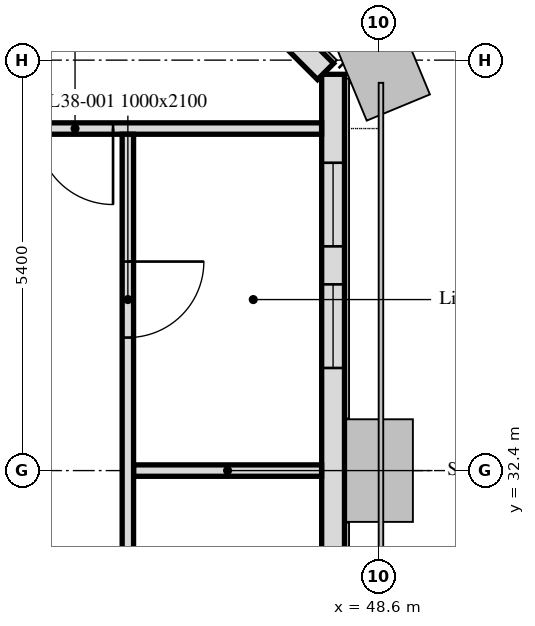
"""IFC4 building model, lengths in metres.
Left out: names, types, materials, properties, quantities, classifications, styles, units other than length and angle.
Written with IfcOpenShell. Run it as: python <this file> out.ifc"""

import sys

from ifc_helpers import new_model, si_unit, direction, frame, frame_2d, origin, place, context, subcontext, project, spatial, rectangle, extrude, element, fill, save


model = new_model("IFC4")
c1 = context("Model", 3, precision=1e-05, world=origin(), true_north=direction((0.0, 1.0)))
c2 = subcontext(c1, "Body", "Model", "MODEL_VIEW")
j1 = project(units=[si_unit("LENGTHUNIT", "METRE"), si_unit("PLANEANGLEUNIT", "RADIAN")], contexts=[c1])
p1 = place(None, origin())
s1 = spatial("IfcSite", under=j1, at=p1, CompositionType="ELEMENT")
p2 = place(p1, origin())
s2 = spatial("IfcBuilding", under=s1, at=p2, CompositionType="ELEMENT")
p3 = place(p2, frame((0.0, 0.0, 162.7)))
s3 = spatial("IfcBuildingStorey", under=s2, at=p3, CompositionType="ELEMENT", Elevation=162.7)
p4 = place(p3, frame((48.0, 5.586, 0.0), z_axis=(0.0, 0.0, 1.0), x_axis=(0.0, 1.0, 0.0)))
e1 = element("IfcWall", 1, at=p4, inside=s3, PredefinedType="SOLIDWALL", context=c2, shape_type="SweptSolid", body=[
    extrude(rectangle(XDim=32.027, YDim=0.3, at=frame_2d((16.014, 0.0))), origin(), (0.0, 0.0, 1.0), 3.0),
])
p5 = place(p4, frame((1.164, 0.0, 0.9)))
e2 = element("IfcOpeningElement", 2, at=p5, cuts=e1, PredefinedType="OPENING", context=c2, shape_type="SweptSolid", body=[
    extrude(rectangle(XDim=1.1, YDim=1.7, at=frame_2d((0.55, 0.85))), frame((0.0, 0.16, 0.0), z_axis=(0.0, -1.0, 0.0), x_axis=(1.0, 0.0, 0.0)), (0.0, 0.0, 1.0), 0.32),
])
p6 = place(p4, frame((2.589, 0.0, 0.9)))
e3 = element("IfcOpeningElement", 3, at=p6, cuts=e1, PredefinedType="OPENING", context=c2, shape_type="SweptSolid", body=[
    extrude(rectangle(XDim=0.65, YDim=1.7, at=frame_2d((0.325, 0.85))), frame((0.0, 0.16, 0.0), z_axis=(0.0, -1.0, 0.0), x_axis=(1.0, 0.0, 0.0)), (0.0, 0.0, 1.0), 0.32),
])
p7 = place(p4, frame((6.214, 0.0, 0.9)))
e4 = element("IfcOpeningElement", 4, at=p7, cuts=e1, PredefinedType="OPENING", context=c2, shape_type="SweptSolid", body=[
    extrude(rectangle(XDim=3.4, YDim=1.7, at=frame_2d((1.7, 0.85))), frame((0.0, 0.16, 0.0), z_axis=(0.0, -1.0, 0.0), x_axis=(1.0, 0.0, 0.0)), (0.0, 0.0, 1.0), 0.32),
])
p8 = place(p4, frame((11.964, 0.0, 0.9)))
e5 = element("IfcOpeningElement", 5, at=p8, cuts=e1, PredefinedType="OPENING", context=c2, shape_type="SweptSolid", body=[
    extrude(rectangle(XDim=1.1, YDim=1.7, at=frame_2d((0.55, 0.85))), frame((0.0, 0.16, 0.0), z_axis=(0.0, -1.0, 0.0), x_axis=(1.0, 0.0, 0.0)), (0.0, 0.0, 1.0), 0.32),
])
p9 = place(p4, frame((13.564, 0.0, 0.9)))
e6 = element("IfcOpeningElement", 6, at=p9, cuts=e1, PredefinedType="OPENING", context=c2, shape_type="SweptSolid", body=[
    extrude(rectangle(XDim=1.1, YDim=1.7, at=frame_2d((0.55, 0.85))), frame((0.0, 0.16, 0.0), z_axis=(0.0, -1.0, 0.0), x_axis=(1.0, 0.0, 0.0)), (0.0, 0.0, 1.0), 0.32),
])
p10 = place(p4, frame((17.364, 0.0, 0.9)))
e7 = element("IfcOpeningElement", 7, at=p10, cuts=e1, PredefinedType="OPENING", context=c2, shape_type="SweptSolid", body=[
    extrude(rectangle(XDim=1.1, YDim=1.7, at=frame_2d((0.55, 0.85))), frame((0.0, 0.16, 0.0), z_axis=(0.0, -1.0, 0.0), x_axis=(1.0, 0.0, 0.0)), (0.0, 0.0, 1.0), 0.32),
])
p11 = place(p4, frame((18.964, 0.0, 0.9)))
e8 = element("IfcOpeningElement", 8, at=p11, cuts=e1, PredefinedType="OPENING", context=c2, shape_type="SweptSolid", body=[
    extrude(rectangle(XDim=1.1, YDim=1.7, at=frame_2d((0.55, 0.85))), frame((0.0, 0.16, 0.0), z_axis=(0.0, -1.0, 0.0), x_axis=(1.0, 0.0, 0.0)), (0.0, 0.0, 1.0), 0.32),
])
p12 = place(p4, frame((22.764, 0.0, 0.9)))
e9 = element("IfcOpeningElement", 9, at=p12, cuts=e1, PredefinedType="OPENING", context=c2, shape_type="SweptSolid", body=[
    extrude(rectangle(XDim=1.1, YDim=1.7, at=frame_2d((0.55, 0.85))), frame((0.0, 0.16, 0.0), z_axis=(0.0, -1.0, 0.0), x_axis=(1.0, 0.0, 0.0)), (0.0, 0.0, 1.0), 0.32),
])
p13 = place(p4, frame((24.364, 0.0, 0.9)))
e10 = element("IfcOpeningElement", 10, at=p13, cuts=e1, PredefinedType="OPENING", context=c2, shape_type="SweptSolid", body=[
    extrude(rectangle(XDim=1.1, YDim=1.7, at=frame_2d((0.55, 0.85))), frame((0.0, 0.16, 0.0), z_axis=(0.0, -1.0, 0.0), x_axis=(1.0, 0.0, 0.0)), (0.0, 0.0, 1.0), 0.32),
])
p14 = place(p4, frame((28.164, 0.0, 0.9)))
e11 = element("IfcOpeningElement", 11, at=p14, cuts=e1, PredefinedType="OPENING", context=c2, shape_type="SweptSolid", body=[
    extrude(rectangle(XDim=1.1, YDim=1.7, at=frame_2d((0.55, 0.85))), frame((0.0, 0.16, 0.0), z_axis=(0.0, -1.0, 0.0), x_axis=(1.0, 0.0, 0.0)), (0.0, 0.0, 1.0), 0.32),
])
p15 = place(p4, frame((29.764, 0.0, 0.9)))
e12 = element("IfcOpeningElement", 12, at=p15, cuts=e1, PredefinedType="OPENING", context=c2, shape_type="SweptSolid", body=[
    extrude(rectangle(XDim=1.1, YDim=1.7, at=frame_2d((0.55, 0.85))), frame((0.0, 0.16, 0.0), z_axis=(0.0, -1.0, 0.0), x_axis=(1.0, 0.0, 0.0)), (0.0, 0.0, 1.0), 0.32),
])
p16 = place(p3, frame((47.901, 37.65, 0.0), z_axis=(0.0, 0.0, 1.0), x_axis=(-0.707106781187, 0.707106781187, 0.0)))
e13 = element("IfcWall", 13, at=p16, inside=s3, PredefinedType="SOLIDWALL", context=c2, shape_type="SweptSolid", body=[
    extrude(rectangle(XDim=6.86, YDim=0.3, at=frame_2d((3.43, 0.0))), origin(), (0.0, 0.0, 1.0), 3.0),
])
p17 = place(p16, frame((1.28, 0.0, 0.9)))
e14 = element("IfcOpeningElement", 14, at=p17, cuts=e13, PredefinedType="OPENING", context=c2, shape_type="SweptSolid", body=[
    extrude(rectangle(XDim=1.1, YDim=1.7, at=frame_2d((0.55, 0.85))), frame((0.0, 0.16, 0.0), z_axis=(0.0, -1.0, 0.0), x_axis=(1.0, 0.0, 0.0)), (0.0, 0.0, 1.0), 0.32),
])
p18 = place(p16, frame((4.48, 0.0, 0.9)))
e15 = element("IfcOpeningElement", 15, at=p18, cuts=e13, PredefinedType="OPENING", context=c2, shape_type="SweptSolid", body=[
    extrude(rectangle(XDim=1.1, YDim=1.7, at=frame_2d((0.55, 0.85))), frame((0.0, 0.16, 0.0), z_axis=(0.0, -1.0, 0.0), x_axis=(1.0, 0.0, 0.0)), (0.0, 0.0, 1.0), 0.32),
])
p19 = place(p3, frame((45.375, 32.4, 0.0), z_axis=(0.0, 0.0, 1.0), x_axis=(1.0, 0.0, 0.0)))
e16 = element("IfcWall", 16, at=p19, inside=s3, PredefinedType="PARTITIONING", context=c2, shape_type="SweptSolid", body=[
    extrude(rectangle(XDim=2.474, YDim=0.15, at=frame_2d((1.237, 0.0))), origin(), (0.0, 0.0, 1.0), 2.4),
])
p20 = place(p3, frame((47.849, 36.9, 0.0), z_axis=(0.0, 0.0, 1.0), x_axis=(-1.0, 0.0, 0.0)))
e17 = element("IfcWall", 17, at=p20, inside=s3, PredefinedType="PARTITIONING", context=c2, shape_type="SweptSolid", body=[
    extrude(rectangle(XDim=41.698, YDim=0.15, at=frame_2d((20.849, 0.0))), origin(), (0.0, 0.0, 1.0), 3.0),
])
p21 = place(p20, frame((39.249, 0.0, 0.0)))
e18 = element("IfcOpeningElement", 18, at=p21, cuts=e17, PredefinedType="OPENING", context=c2, shape_type="SweptSolid", body=[
    extrude(rectangle(XDim=1.0, YDim=2.1, at=frame_2d((0.5, 1.05))), frame((0.0, 0.075, 0.0), z_axis=(0.0, -1.0, 0.0), x_axis=(1.0, 0.0, 0.0)), (0.0, 0.0, 1.0), 0.15),
])
p22 = place(p20, frame((28.449, 0.0, 0.0)))
e19 = element("IfcOpeningElement", 19, at=p22, cuts=e17, PredefinedType="OPENING", context=c2, shape_type="SweptSolid", body=[
    extrude(rectangle(XDim=1.0, YDim=2.1, at=frame_2d((0.5, 1.05))), frame((0.0, 0.075, 0.0), z_axis=(0.0, -1.0, 0.0), x_axis=(1.0, 0.0, 0.0)), (0.0, 0.0, 1.0), 0.15),
])
p23 = place(p20, frame((16.849, 0.0, 0.0)))
e20 = element("IfcOpeningElement", 20, at=p23, cuts=e17, PredefinedType="OPENING", context=c2, shape_type="SweptSolid", body=[
    extrude(rectangle(XDim=1.0, YDim=2.1, at=frame_2d((0.5, 1.05))), frame((0.0, 0.075, 0.0), z_axis=(0.0, -1.0, 0.0), x_axis=(1.0, 0.0, 0.0)), (0.0, 0.0, 1.0), 0.15),
])
p24 = place(p20, frame((11.449, 0.0, 0.0)))
e21 = element("IfcOpeningElement", 21, at=p24, cuts=e17, PredefinedType="OPENING", context=c2, shape_type="SweptSolid", body=[
    extrude(rectangle(XDim=1.0, YDim=2.1, at=frame_2d((0.5, 1.05))), frame((0.0, 0.075, 0.0), z_axis=(0.0, -1.0, 0.0), x_axis=(1.0, 0.0, 0.0)), (0.0, 0.0, 1.0), 0.15),
])
p25 = place(p20, frame((2.744, 0.0, 0.0)))
e22 = element("IfcOpeningElement", 22, at=p25, cuts=e17, PredefinedType="OPENING", context=c2, shape_type="SweptSolid", body=[
    extrude(rectangle(XDim=1.0, YDim=2.1, at=frame_2d((0.5, 1.05))), frame((0.0, 0.075, 0.0), z_axis=(0.0, -1.0, 0.0), x_axis=(1.0, 0.0, 0.0)), (0.0, 0.0, 1.0), 0.15),
])
p26 = place(p3, frame((45.3, 36.825, 0.0), z_axis=(0.0, 0.0, 1.0), x_axis=(0.0, -1.0, 0.0)))
e23 = element("IfcWall", 23, at=p26, inside=s3, PredefinedType="PARTITIONING", context=c2, shape_type="SweptSolid", body=[
    extrude(rectangle(XDim=15.15, YDim=0.15, at=frame_2d((7.575, 0.0))), origin(), (0.0, 0.0, 1.0), 2.4),
])
p27 = place(p26, frame((1.675, 0.0, 0.0)))
e24 = element("IfcOpeningElement", 24, at=p27, cuts=e23, PredefinedType="OPENING", context=c2, shape_type="SweptSolid", body=[
    extrude(rectangle(XDim=1.0, YDim=2.1, at=frame_2d((0.5, 1.05))), frame((0.0, 0.075, 0.0), z_axis=(0.0, -1.0, 0.0), x_axis=(1.0, 0.0, 0.0)), (0.0, 0.0, 1.0), 0.15),
])
p28 = place(p26, frame((7.975, 0.0, 0.0)))
e25 = element("IfcOpeningElement", 25, at=p28, cuts=e23, PredefinedType="OPENING", context=c2, shape_type="SweptSolid", body=[
    extrude(rectangle(XDim=1.0, YDim=2.1, at=frame_2d((0.5, 1.05))), frame((0.0, 0.075, 0.0), z_axis=(0.0, -1.0, 0.0), x_axis=(1.0, 0.0, 0.0)), (0.0, 0.0, 1.0), 0.15),
])
p29 = place(p14, origin())
e26 = element("IfcWindow", 26, at=p29, inside=s3, PartitioningType="SINGLE_PANEL", PredefinedType="WINDOW", context=c2, shape_type="SweptSolid", body=[
    extrude(rectangle(XDim=1.1, YDim=1.7, at=frame_2d((0.55, 0.85))), frame((0.0, 0.03, 0.0), z_axis=(0.0, -1.0, 0.0), x_axis=(1.0, 0.0, 0.0)), (0.0, 0.0, 1.0), 0.06),
])
fill(e11, e26)
p30 = place(p15, origin())
e27 = element("IfcWindow", 27, at=p30, inside=s3, PartitioningType="SINGLE_PANEL", PredefinedType="WINDOW", context=c2, shape_type="SweptSolid", body=[
    extrude(rectangle(XDim=1.1, YDim=1.7, at=frame_2d((0.55, 0.85))), frame((0.0, 0.03, 0.0), z_axis=(0.0, -1.0, 0.0), x_axis=(1.0, 0.0, 0.0)), (0.0, 0.0, 1.0), 0.06),
])
fill(e12, e27)
p31 = place(p27, origin())
e28 = element("IfcDoor", 28, at=p31, inside=s3, OperationType="SINGLE_SWING_LEFT", PredefinedType="DOOR", context=c2, shape_type="SweptSolid", body=[
    extrude(rectangle(XDim=1.0, YDim=2.1, at=frame_2d((0.5, 1.05))), frame((0.0, 0.025, 0.0), z_axis=(0.0, -1.0, 0.0), x_axis=(1.0, 0.0, 0.0)), (0.0, 0.0, 1.0), 0.05),
])
fill(e24, e28)
p32 = place(p25, origin())
e29 = element("IfcDoor", 29, at=p32, inside=s3, OperationType="SINGLE_SWING_RIGHT", PredefinedType="DOOR", context=c2, shape_type="SweptSolid", body=[
    extrude(rectangle(XDim=1.0, YDim=2.1, at=frame_2d((0.5, 1.05))), frame((0.0, 0.025, 0.0), z_axis=(0.0, -1.0, 0.0), x_axis=(1.0, 0.0, 0.0)), (0.0, 0.0, 1.0), 0.05),
])
fill(e22, e29)
save(model, sys.argv[1])
